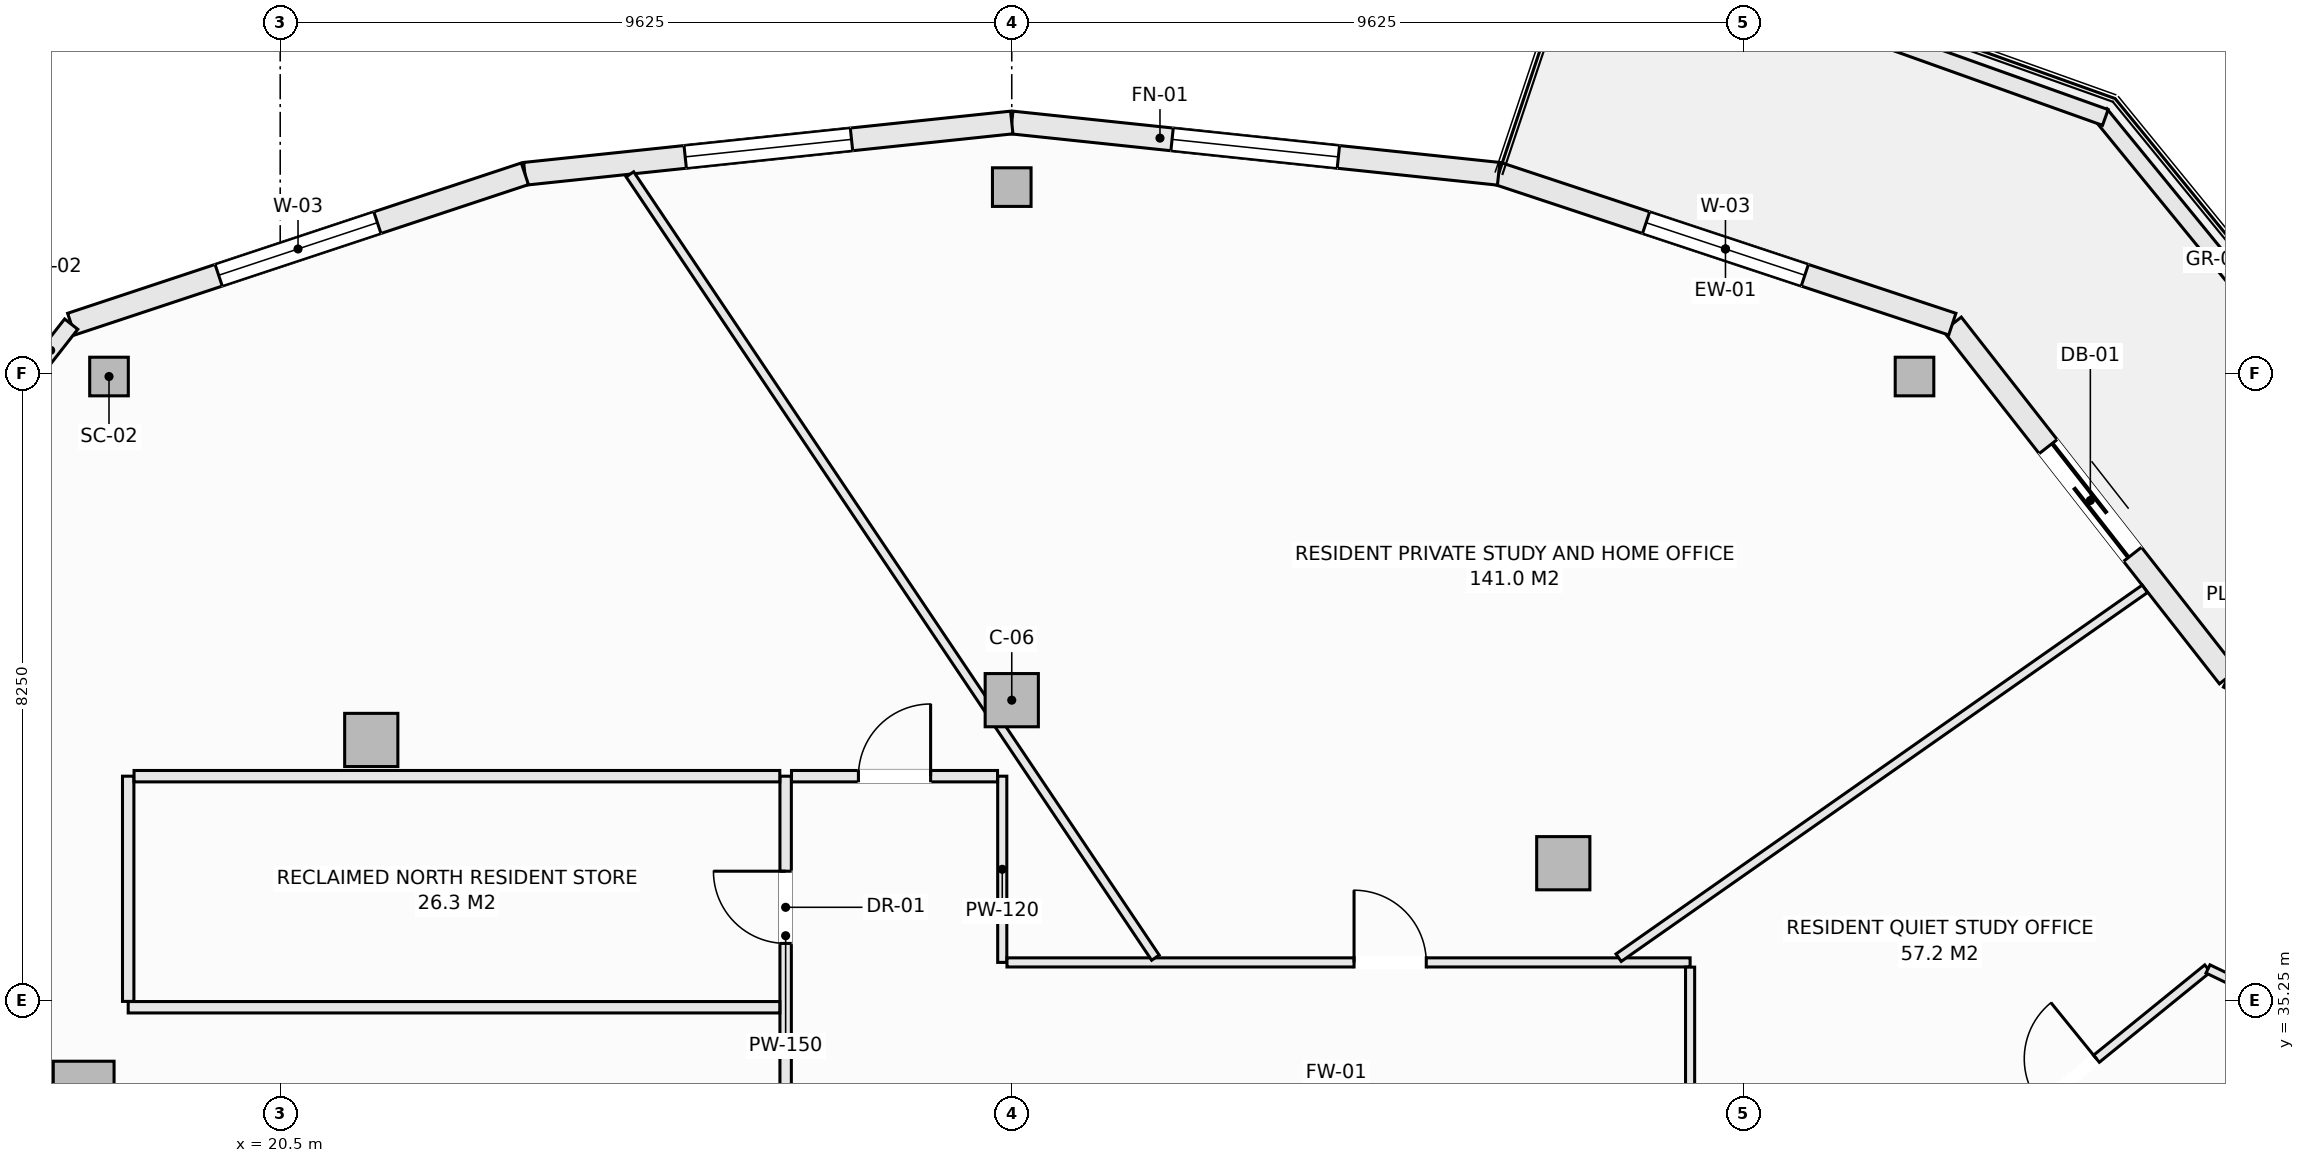
"""IFC4 building model, lengths in metres.
Left out: names, types, materials, properties, quantities, classifications, styles, units other than length and angle.
Written with IfcOpenShell. Run it as: python <this file> out.ifc"""

import sys

from ifc_helpers import new_model, si_unit, direction, frame, frame_2d, origin, origin_2d, place, context, subcontext, project, spatial, rectangle, hollow_rectangle, extrude, element, fill, save


model = new_model("IFC4")
c1 = context("Model", 3, precision=1e-05, world=origin(), true_north=direction((0.0, 1.0)))
c2 = subcontext(c1, "Body", "Model", "MODEL_VIEW")
j1 = project(units=[si_unit("LENGTHUNIT", "METRE"), si_unit("PLANEANGLEUNIT", "RADIAN")], contexts=[c1])
p1 = place(None, origin())
s1 = spatial("IfcSite", under=j1, at=p1, CompositionType="ELEMENT")
p2 = place(p1, origin())
s2 = spatial("IfcBuilding", under=s1, at=p2, CompositionType="ELEMENT")
p3 = place(p2, frame((0.0, 0.0, 219.5)))
s3 = spatial("IfcBuildingStorey", under=s2, at=p3, CompositionType="ELEMENT", Elevation=219.5)
for number, where, z_axis, x_axis in (
    (1, (42.003, 43.458, -0.27), (0.0, 0.0, 1.0), (1.0, 0.0, 0.0)),
    (2, (30.125, 45.95, -0.27), (0.0, 0.0, 1.0), (1.0, 0.0, 0.0)),
    (3, (18.247, 43.458, -0.27), (0.0, 0.0, 1.0), (1.0, 0.0, 0.0)),
):
    element("IfcColumn", number, at=place(p3, frame(where, z_axis=z_axis, x_axis=x_axis)), inside=s3, PredefinedType="COLUMN", context=c2, shape_type="SweptSolid", body=[
        extrude(hollow_rectangle(XDim=0.508, YDim=0.508, WallThickness=0.019, at=origin_2d()), origin(), (0.0, 0.0, 1.0), 3.3),
    ])
for number, where, z_axis, x_axis in (
    (4, (37.382, 37.055, -0.27), (0.0, 0.0, 1.0), (1.0, 0.0, 0.0)),
    (5, (30.125, 39.2, -0.27), (0.0, 0.0, 1.0), (1.0, 0.0, 0.0)),
    (6, (21.698, 38.677, -0.27), (0.0, 0.0, 1.0), (1.0, 0.0, 0.0)),
):
    element("IfcColumn", number, at=place(p3, frame(where, z_axis=z_axis, x_axis=x_axis)), inside=s3, PredefinedType="COLUMN", context=c2, shape_type="SweptSolid", body=[
        extrude(rectangle(XDim=0.7, YDim=0.7, at=origin_2d()), origin(), (0.0, 0.0, 1.0), 3.3),
    ])
p4 = place(p3, frame((17.914, 34.05, -0.27), z_axis=(0.0, 0.0, 1.0), x_axis=(1.0, 0.0, 0.0)))
e7 = element("IfcColumn", 7, at=p4, inside=s3, PredefinedType="PILASTER", context=c2, shape_type="SweptSolid", body=[
    extrude(rectangle(XDim=0.8, YDim=0.8, at=origin_2d()), origin(), (0.0, 0.0, 1.0), 3.3),
])
p5 = place(p3, frame((46.133, 39.507, 0.0), z_axis=(0.0, 0.0, 1.0), x_axis=(0.901348331142, -0.433094892545, 0.0)))
e8 = element("IfcWall", 8, at=p5, inside=s3, PredefinedType="SOLIDWALL", context=c2, shape_type="SweptSolid", body=[
    extrude(rectangle(XDim=6.021, YDim=0.3, at=frame_2d((3.01, 0.0))), origin(), (0.0, 0.0, 1.0), 2.605),
])
p6 = place(p5, frame((1.91, 0.0, 0.72)))
e9 = element("IfcOpeningElement", 9, at=p6, cuts=e8, PredefinedType="OPENING", context=c2, shape_type="SweptSolid", body=[
    extrude(rectangle(XDim=2.2, YDim=1.65, at=frame_2d((1.1, 0.825))), frame((0.0, 0.16, 0.0), z_axis=(0.0, -1.0, 0.0), x_axis=(1.0, 0.0, 0.0)), (0.0, 0.0, 1.0), 0.32),
])
p7 = place(p3, frame((42.5, 44.147, 0.0), z_axis=(0.0, 0.0, 1.0), x_axis=(0.616450126935, -0.787393955401, 0.0)))
e10 = element("IfcWall", 10, at=p7, inside=s3, PredefinedType="SOLIDWALL", context=c2, shape_type="SweptSolid", body=[
    extrude(rectangle(XDim=5.893, YDim=0.3, at=frame_2d((2.946, 0.0))), origin(), (0.0, 0.0, 1.0), 2.605),
])
p8 = place(p7, frame((2.046, 0.0, 0.0)))
e11 = element("IfcOpeningElement", 11, at=p8, cuts=e10, PredefinedType="OPENING", context=c2, shape_type="SweptSolid", body=[
    extrude(rectangle(XDim=1.8, YDim=2.25, at=frame_2d((0.9, 1.125))), frame((0.0, 0.16, 0.0), z_axis=(0.0, -1.0, 0.0), x_axis=(1.0, 0.0, 0.0)), (0.0, 0.0, 1.0), 0.32),
])
p9 = place(p3, frame((36.531, 46.125, 0.0), z_axis=(0.0, 0.0, 1.0), x_axis=(0.949240877604, -0.314550085495, 0.0)))
e12 = element("IfcWall", 12, at=p9, inside=s3, PredefinedType="SOLIDWALL", context=c2, shape_type="SweptSolid", body=[
    extrude(rectangle(XDim=6.288, YDim=0.3, at=frame_2d((3.144, 0.0))), origin(), (0.0, 0.0, 1.0), 2.605),
])
p10 = place(p9, frame((2.044, 0.0, 0.72)))
e13 = element("IfcOpeningElement", 13, at=p10, cuts=e12, PredefinedType="OPENING", context=c2, shape_type="SweptSolid", body=[
    extrude(rectangle(XDim=2.2, YDim=1.65, at=frame_2d((1.1, 0.825))), frame((0.0, 0.16, 0.0), z_axis=(0.0, -1.0, 0.0), x_axis=(1.0, 0.0, 0.0)), (0.0, 0.0, 1.0), 0.32),
])
p11 = place(p3, frame((30.125, 46.8, 0.0), z_axis=(0.0, 0.0, 1.0), x_axis=(0.994497142298, -0.104763705363, 0.0)))
e14 = element("IfcWall", 14, at=p11, inside=s3, PredefinedType="SOLIDWALL", context=c2, shape_type="SweptSolid", body=[
    extrude(rectangle(XDim=6.441, YDim=0.3, at=frame_2d((3.221, 0.0))), origin(), (0.0, 0.0, 1.0), 2.605),
])
p12 = place(p11, frame((2.121, 0.0, 0.72)))
e15 = element("IfcOpeningElement", 15, at=p12, cuts=e14, PredefinedType="OPENING", context=c2, shape_type="SweptSolid", body=[
    extrude(rectangle(XDim=2.2, YDim=1.65, at=frame_2d((1.1, 0.825))), frame((0.0, 0.16, 0.0), z_axis=(0.0, -1.0, 0.0), x_axis=(1.0, 0.0, 0.0)), (0.0, 0.0, 1.0), 0.32),
])
p13 = place(p3, frame((23.719, 46.125, 0.0), z_axis=(0.0, 0.0, 1.0), x_axis=(0.994497142298, 0.104763705363, 0.0)))
e16 = element("IfcWall", 16, at=p13, inside=s3, PredefinedType="SOLIDWALL", context=c2, shape_type="SweptSolid", body=[
    extrude(rectangle(XDim=6.441, YDim=0.3, at=frame_2d((3.221, 0.0))), origin(), (0.0, 0.0, 1.0), 2.605),
])
p14 = place(p13, frame((2.121, 0.0, 0.72)))
e17 = element("IfcOpeningElement", 17, at=p14, cuts=e16, PredefinedType="OPENING", context=c2, shape_type="SweptSolid", body=[
    extrude(rectangle(XDim=2.2, YDim=1.65, at=frame_2d((1.1, 0.825))), frame((0.0, 0.16, 0.0), z_axis=(0.0, -1.0, 0.0), x_axis=(1.0, 0.0, 0.0)), (0.0, 0.0, 1.0), 0.32),
])
p15 = place(p3, frame((17.75, 44.147, 0.0), z_axis=(0.0, 0.0, 1.0), x_axis=(0.949240877604, 0.314550085495, 0.0)))
e18 = element("IfcWall", 18, at=p15, inside=s3, PredefinedType="SOLIDWALL", context=c2, shape_type="SweptSolid", body=[
    extrude(rectangle(XDim=6.288, YDim=0.3, at=frame_2d((3.144, 0.0))), origin(), (0.0, 0.0, 1.0), 2.605),
])
p16 = place(p15, frame((2.044, 0.0, 0.72)))
e19 = element("IfcOpeningElement", 19, at=p16, cuts=e18, PredefinedType="OPENING", context=c2, shape_type="SweptSolid", body=[
    extrude(rectangle(XDim=2.2, YDim=1.65, at=frame_2d((1.1, 0.825))), frame((0.0, 0.16, 0.0), z_axis=(0.0, -1.0, 0.0), x_axis=(1.0, 0.0, 0.0)), (0.0, 0.0, 1.0), 0.32),
])
p17 = place(p3, frame((17.21, 43.458, 0.0), z_axis=(0.0, 0.0, 1.0), x_axis=(0.616466126167, 0.787381429352, 0.0)))
e20 = element("IfcWall", 20, at=p17, inside=s3, PredefinedType="SOLIDWALL", context=c2, shape_type="SweptSolid", body=[
    extrude(rectangle(XDim=0.876, YDim=0.22, at=frame_2d((0.438, 0.0))), origin(), (0.0, 0.0, 1.0), 2.605),
])
p18 = place(p3, frame((44.448, 46.913, 0.0), z_axis=(0.0, 0.0, 1.0), x_axis=(0.632697312147, -0.774399193699, 0.0)))
e21 = element("IfcWall", 21, at=p18, inside=s3, PredefinedType="PARAPET", context=c2, shape_type="SweptSolid", body=[
    extrude(rectangle(XDim=6.914, YDim=0.22, at=frame_2d((3.457, 0.0))), origin(), (0.0, 0.0, 1.0), 0.52),
])
p19 = place(p3, frame((37.565, 49.347, 0.0), z_axis=(0.0, 0.0, 1.0), x_axis=(0.941780086523, -0.336229488042, 0.0)))
e22 = element("IfcWall", 22, at=p19, inside=s3, PredefinedType="PARAPET", context=c2, shape_type="SweptSolid", body=[
    extrude(rectangle(XDim=7.378, YDim=0.22, at=frame_2d((3.689, 0.0))), origin(), (0.0, 0.0, 1.0), 0.52),
])
p20 = place(p3, frame((27.15, 34.002, 0.0), z_axis=(0.0, 0.0, 1.0), x_axis=(0.0, 1.0, 0.0)))
e23 = element("IfcWall", 23, at=p20, inside=s3, PredefinedType="PARTITIONING", context=c2, shape_type="SweptSolid", body=[
    extrude(rectangle(XDim=4.198, YDim=0.15, at=frame_2d((2.099, 0.0))), origin(), (0.0, 0.0, 1.0), 3.03),
])
p21 = place(p20, frame((1.998, 0.0, 0.0)))
e24 = element("IfcOpeningElement", 24, at=p21, cuts=e23, PredefinedType="OPENING", context=c2, shape_type="SweptSolid", body=[
    extrude(rectangle(XDim=0.95, YDim=2.1, at=frame_2d((0.475, 1.05))), frame((0.0, 0.085, 0.0), z_axis=(0.0, -1.0, 0.0), x_axis=(1.0, 0.0, 0.0)), (0.0, 0.0, 1.0), 0.17),
])
p22 = place(p3, frame((30.0, 35.75, 0.0), z_axis=(0.0, 0.0, 1.0), x_axis=(0.0, 1.0, 0.0)))
e25 = element("IfcWall", 25, at=p22, inside=s3, PredefinedType="PARTITIONING", context=c2, shape_type="SweptSolid", body=[
    extrude(rectangle(XDim=2.45, YDim=0.12, at=frame_2d((1.225, 0.0))), origin(), (0.0, 0.0, 1.0), 3.03),
])
p23 = place(p3, frame((18.5, 35.16, 0.0), z_axis=(0.0, 0.0, 1.0), x_axis=(1.0, 0.0, 0.0)))
e26 = element("IfcWall", 26, at=p23, inside=s3, PredefinedType="PARTITIONING", context=c2, shape_type="SweptSolid", body=[
    extrude(rectangle(XDim=8.573, YDim=0.15, at=frame_2d((4.287, 0.0))), origin(), (0.0, 0.0, 1.0), 3.03),
])
p24 = place(p3, frame((18.5, 35.237, 0.0), z_axis=(0.0, 0.0, 1.0), x_axis=(0.0, 1.0, 0.0)))
e27 = element("IfcWall", 27, at=p24, inside=s3, PredefinedType="PARTITIONING", context=c2, shape_type="SweptSolid", body=[
    extrude(rectangle(XDim=2.963, YDim=0.15, at=frame_2d((1.481, 0.0))), origin(), (0.0, 0.0, 1.0), 3.03),
])
p25 = place(p3, frame((18.577, 38.2, 0.0), z_axis=(0.0, 0.0, 1.0), x_axis=(1.0, 0.0, 0.0)))
e28 = element("IfcWall", 28, at=p25, inside=s3, PredefinedType="PARTITIONING", context=c2, shape_type="SweptSolid", body=[
    extrude(rectangle(XDim=8.496, YDim=0.15, at=frame_2d((4.248, 0.0))), origin(), (0.0, 0.0, 1.0), 3.03),
])
p26 = place(p3, frame((27.227, 38.2, 0.0), z_axis=(0.0, 0.0, 1.0), x_axis=(1.0, 0.0, 0.0)))
e29 = element("IfcWall", 29, at=p26, inside=s3, PredefinedType="PARTITIONING", context=c2, shape_type="SweptSolid", body=[
    extrude(rectangle(XDim=2.711, YDim=0.15, at=frame_2d((1.355, 0.0))), origin(), (0.0, 0.0, 1.0), 3.03),
])
p27 = place(p26, frame((0.881, 0.0, 0.0)))
e30 = element("IfcOpeningElement", 30, at=p27, cuts=e29, PredefinedType="OPENING", context=c2, shape_type="SweptSolid", body=[
    extrude(rectangle(XDim=0.95, YDim=2.1, at=frame_2d((0.475, 1.05))), frame((0.0, 0.085, 0.0), z_axis=(0.0, -1.0, 0.0), x_axis=(1.0, 0.0, 0.0)), (0.0, 0.0, 1.0), 0.17),
])
p28 = place(p3, frame((30.062, 35.75, 0.0), z_axis=(0.0, 0.0, 1.0), x_axis=(1.0, 0.0, 0.0)))
e31 = element("IfcWall", 31, at=p28, inside=s3, PredefinedType="PARTITIONING", context=c2, shape_type="SweptSolid", body=[
    extrude(rectangle(XDim=8.988, YDim=0.12, at=frame_2d((4.494, 0.0))), origin(), (0.0, 0.0, 1.0), 2.478),
])
p29 = place(p28, frame((4.567, 0.0, 0.0)))
e32 = element("IfcOpeningElement", 32, at=p29, cuts=e31, PredefinedType="OPENING", context=c2, shape_type="SweptSolid", body=[
    extrude(rectangle(XDim=0.95, YDim=2.1, at=frame_2d((0.475, 1.05))), frame((0.0, 0.07, 0.0), z_axis=(0.0, -1.0, 0.0), x_axis=(1.0, 0.0, 0.0)), (0.0, 0.0, 1.0), 0.14),
])
p30 = place(p3, frame((39.05, 33.75, 0.0), z_axis=(0.0, 0.0, 1.0), x_axis=(0.0, 1.0, 0.0)))
e33 = element("IfcWall", 33, at=p30, inside=s3, PredefinedType="PARTITIONING", context=c2, shape_type="SweptSolid", body=[
    extrude(rectangle(XDim=1.938, YDim=0.12, at=frame_2d((0.969, 0.0))), origin(), (0.0, 0.0, 1.0), 3.03),
])
p31 = place(p3, frame((42.196, 32.696, 0.0), z_axis=(0.0, 0.0, 1.0), x_axis=(0.776319732197, 0.630339331949, 0.0)))
e34 = element("IfcWall", 34, at=p31, inside=s3, PredefinedType="PARTITIONING", context=c2, shape_type="SweptSolid", body=[
    extrude(rectangle(XDim=4.718, YDim=0.12, at=frame_2d((2.359, 0.0))), origin(), (0.0, 0.0, 1.0), 2.77),
])
p32 = place(p31, frame((1.884, 0.0, 0.0)))
e35 = element("IfcOpeningElement", 35, at=p32, cuts=e34, PredefinedType="OPENING", context=c2, shape_type="SweptSolid", body=[
    extrude(rectangle(XDim=0.95, YDim=2.1, at=frame_2d((0.475, 1.05))), frame((0.0, 0.07, 0.0), z_axis=(0.0, -1.0, 0.0), x_axis=(1.0, 0.0, 0.0)), (0.0, 0.0, 1.0), 0.14),
])
p33 = place(p3, frame((45.864, 35.664, 0.0), z_axis=(0.0, 0.0, 1.0), x_axis=(0.901492416592, -0.432794896951, 0.0)))
e36 = element("IfcWall", 36, at=p33, inside=s3, PredefinedType="PARTITIONING", context=c2, shape_type="SweptSolid", body=[
    extrude(rectangle(XDim=2.611, YDim=0.12, at=frame_2d((1.306, 0.0))), origin(), (0.0, 0.0, 1.0), 3.03),
])
p34 = place(p3, frame((41.52, 29.108, 0.0), z_axis=(0.0, 0.0, 1.0), x_axis=(0.777032738693, 0.629460183808, 0.0)))
e37 = element("IfcWall", 37, at=p34, inside=s3, PredefinedType="PARTITIONING", context=c2, shape_type="SweptSolid", body=[
    extrude(rectangle(XDim=8.552, YDim=0.12, at=frame_2d((4.276, 0.0))), origin(), (0.0, 0.0, 1.0), 3.03),
])
p35 = place(p34, frame((1.278, 0.0, 0.0)))
e38 = element("IfcOpeningElement", 38, at=p35, cuts=e37, PredefinedType="OPENING", context=c2, shape_type="SweptSolid", body=[
    extrude(rectangle(XDim=0.95, YDim=2.1, at=frame_2d((0.475, 1.05))), frame((0.0, 0.07, 0.0), z_axis=(0.0, -1.0, 0.0), x_axis=(1.0, 0.0, 0.0)), (0.0, 0.0, 1.0), 0.14),
])
p36 = place(p34, frame((4.977, 0.0, 0.0)))
e39 = element("IfcOpeningElement", 39, at=p36, cuts=e37, PredefinedType="OPENING", context=c2, shape_type="SweptSolid", body=[
    extrude(rectangle(XDim=0.95, YDim=2.1, at=frame_2d((0.475, 1.05))), frame((0.0, 0.07, 0.0), z_axis=(0.0, -1.0, 0.0), x_axis=(1.0, 0.0, 0.0)), (0.0, 0.0, 1.0), 0.14),
])
p37 = place(p3, frame((38.11, 35.812, 0.0), z_axis=(0.0, 0.0, 1.0), x_axis=(0.81888313017, 0.57396029403, 0.0)))
e40 = element("IfcWall", 40, at=p37, inside=s3, PredefinedType="PARTITIONING", context=c2, shape_type="SweptSolid", body=[
    extrude(rectangle(XDim=8.455, YDim=0.12, at=frame_2d((4.228, 0.0))), origin(), (0.0, 0.0, 1.0), 3.03),
])
p38 = place(p3, frame((25.101, 46.118, 0.0), z_axis=(0.0, 0.0, 1.0), x_axis=(0.557162782685, -0.830403295749, 0.0)))
e41 = element("IfcWall", 41, at=p38, inside=s3, PredefinedType="PARTITIONING", context=c2, shape_type="SweptSolid", body=[
    extrude(rectangle(XDim=12.411, YDim=0.12, at=frame_2d((6.205, 0.0))), origin(), (0.0, 0.0, 1.0), 3.03),
])
p39 = place(p8, origin())
e42 = element("IfcDoor", 42, at=p39, inside=s3, OperationType="SLIDING_TO_LEFT", PredefinedType="DOOR", context=c2, shape_type="SweptSolid", body=[
    extrude(rectangle(XDim=1.8, YDim=2.25, at=frame_2d((0.9, 1.125))), frame((0.0, 0.025, 0.0), z_axis=(0.0, -1.0, 0.0), x_axis=(1.0, 0.0, 0.0)), (0.0, 0.0, 1.0), 0.05),
])
fill(e11, e42)
p40 = place(p10, origin())
e43 = element("IfcWindow", 43, at=p40, inside=s3, PartitioningType="SINGLE_PANEL", PredefinedType="WINDOW", context=c2, shape_type="SweptSolid", body=[
    extrude(rectangle(XDim=2.2, YDim=1.65, at=frame_2d((1.1, 0.825))), frame((0.0, 0.03, 0.0), z_axis=(0.0, -1.0, 0.0), x_axis=(1.0, 0.0, 0.0)), (0.0, 0.0, 1.0), 0.06),
])
fill(e13, e43)
p41 = place(p12, origin())
e44 = element("IfcWindow", 44, at=p41, inside=s3, PartitioningType="SINGLE_PANEL", PredefinedType="WINDOW", context=c2, shape_type="SweptSolid", body=[
    extrude(rectangle(XDim=2.2, YDim=1.65, at=frame_2d((1.1, 0.825))), frame((0.0, 0.03, 0.0), z_axis=(0.0, -1.0, 0.0), x_axis=(1.0, 0.0, 0.0)), (0.0, 0.0, 1.0), 0.06),
])
fill(e15, e44)
p42 = place(p14, origin())
e45 = element("IfcWindow", 45, at=p42, inside=s3, PartitioningType="SINGLE_PANEL", PredefinedType="WINDOW", context=c2, shape_type="SweptSolid", body=[
    extrude(rectangle(XDim=2.2, YDim=1.65, at=frame_2d((1.1, 0.825))), frame((0.0, 0.03, 0.0), z_axis=(0.0, -1.0, 0.0), x_axis=(1.0, 0.0, 0.0)), (0.0, 0.0, 1.0), 0.06),
])
fill(e17, e45)
p43 = place(p16, origin())
e46 = element("IfcWindow", 46, at=p43, inside=s3, PartitioningType="SINGLE_PANEL", PredefinedType="WINDOW", context=c2, shape_type="SweptSolid", body=[
    extrude(rectangle(XDim=2.2, YDim=1.65, at=frame_2d((1.1, 0.825))), frame((0.0, 0.03, 0.0), z_axis=(0.0, -1.0, 0.0), x_axis=(1.0, 0.0, 0.0)), (0.0, 0.0, 1.0), 0.06),
])
fill(e19, e46)
p44 = place(p21, origin())
e47 = element("IfcDoor", 47, at=p44, inside=s3, OperationType="SINGLE_SWING_RIGHT", PredefinedType="DOOR", context=c2, shape_type="SweptSolid", body=[
    extrude(rectangle(XDim=0.95, YDim=2.1, at=frame_2d((0.475, 1.05))), frame((0.0, 0.025, 0.0), z_axis=(0.0, -1.0, 0.0), x_axis=(1.0, 0.0, 0.0)), (0.0, 0.0, 1.0), 0.05),
])
fill(e24, e47)
p45 = place(p32, origin())
e48 = element("IfcDoor", 48, at=p45, inside=s3, OperationType="SINGLE_SWING_RIGHT", PredefinedType="DOOR", context=c2, shape_type="SweptSolid", body=[
    extrude(rectangle(XDim=0.95, YDim=2.1, at=frame_2d((0.475, 1.05))), frame((0.0, 0.025, 0.0), z_axis=(0.0, -1.0, 0.0), x_axis=(1.0, 0.0, 0.0)), (0.0, 0.0, 1.0), 0.05),
])
fill(e35, e48)
p46 = place(p29, origin())
e49 = element("IfcDoor", 49, at=p46, inside=s3, OperationType="SINGLE_SWING_LEFT", PredefinedType="DOOR", context=c2, shape_type="SweptSolid", body=[
    extrude(rectangle(XDim=0.95, YDim=2.1, at=frame_2d((0.475, 1.05))), frame((0.0, 0.025, 0.0), z_axis=(0.0, -1.0, 0.0), x_axis=(1.0, 0.0, 0.0)), (0.0, 0.0, 1.0), 0.05),
])
fill(e32, e49)
p47 = place(p27, origin())
e50 = element("IfcDoor", 50, at=p47, inside=s3, OperationType="SINGLE_SWING_RIGHT", PredefinedType="DOOR", context=c2, shape_type="SweptSolid", body=[
    extrude(rectangle(XDim=0.95, YDim=2.1, at=frame_2d((0.475, 1.05))), frame((0.0, 0.025, 0.0), z_axis=(0.0, -1.0, 0.0), x_axis=(1.0, 0.0, 0.0)), (0.0, 0.0, 1.0), 0.05),
])
fill(e30, e50)
save(model, sys.argv[1])
